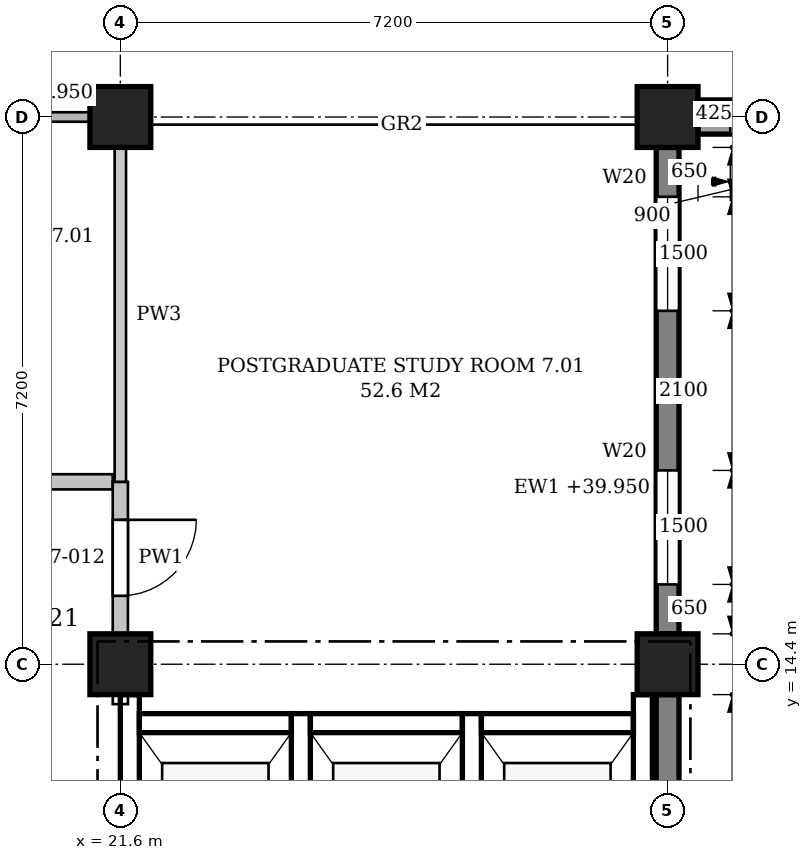
"""IFC4 building model, lengths in metres.
Left out: names, types, materials, properties, quantities, classifications, styles, units other than length and angle.
Written with IfcOpenShell. Run it as: python <this file> out.ifc"""

import sys

from ifc_helpers import new_model, si_unit, direction, frame, frame_2d, origin, origin_2d, place, context, subcontext, project, spatial, polyline, rectangle, outline, extrude, element, fill, save


model = new_model("IFC4")
c1 = context("Model", 3, precision=1e-05, world=origin(), true_north=direction((0.0, 1.0)))
c2 = subcontext(c1, "Body", "Model", "MODEL_VIEW")
j1 = project(units=[si_unit("LENGTHUNIT", "METRE"), si_unit("PLANEANGLEUNIT", "RADIAN")], contexts=[c1])
p1 = place(None, origin())
s1 = spatial("IfcSite", under=j1, at=p1, CompositionType="ELEMENT")
p2 = place(p1, origin())
s2 = spatial("IfcBuilding", under=s1, at=p2, CompositionType="ELEMENT")
p3 = place(p2, frame((0.0, 0.0, 36.0)))
s3 = spatial("IfcBuildingStorey", under=s2, at=p3, CompositionType="ELEMENT", Elevation=36.0)
for number, where, z_axis, x_axis in (
    (1, (21.6, 14.4, 0.0), (0.0, 0.0, 1.0), (1.0, 0.0, 0.0)),
    (2, (21.6, 21.6, 0.0), (0.0, 0.0, 1.0), (1.0, 0.0, 0.0)),
    (3, (28.8, 14.4, 0.0), (0.0, 0.0, 1.0), (1.0, 0.0, 0.0)),
    (4, (28.8, 21.6, 0.0), (0.0, 0.0, 1.0), (1.0, 0.0, 0.0)),
):
    element("IfcColumn", number, at=place(p3, frame(where, z_axis=z_axis, x_axis=x_axis)), inside=s3, PredefinedType="COLUMN", context=c2, shape_type="SweptSolid", body=[
        extrude(rectangle(XDim=0.8, YDim=0.8, at=origin_2d()), origin(), (0.0, 0.0, 1.0), 4.8),
    ])
p4 = place(p3, frame((28.8, 7.6, 0.0), z_axis=(0.0, 0.0, 1.0), x_axis=(0.0, 1.0, 0.0)))
e5 = element("IfcWall", 5, at=p4, inside=s3, PredefinedType="STANDARD", context=c2, shape_type="SweptSolid", body=[
    extrude(rectangle(XDim=6.4, YDim=0.3, at=frame_2d((3.2, 0.0))), origin(), (0.0, 0.0, 1.0), 3.95),
])
p5 = place(p4, frame((0.65, 0.0, 0.9)))
e6 = element("IfcOpeningElement", 6, at=p5, cuts=e5, PredefinedType="OPENING", context=c2, shape_type="SweptSolid", body=[
    extrude(outline(polyline([(0.0, 0.0), (1.5, 0.0), (1.5, 2.25), (0.75, 3.0), (0.0, 2.25), (0.0, 0.0)])), frame((0.0, 0.16, 0.0), z_axis=(0.0, -1.0, 0.0), x_axis=(1.0, 0.0, 0.0)), (0.0, 0.0, 1.0), 0.32),
])
p6 = place(p3, frame((28.8, 14.8, 0.0), z_axis=(0.0, 0.0, 1.0), x_axis=(0.0, 1.0, 0.0)))
e7 = element("IfcWall", 7, at=p6, inside=s3, PredefinedType="STANDARD", context=c2, shape_type="SweptSolid", body=[
    extrude(rectangle(XDim=6.4, YDim=0.3, at=frame_2d((3.2, 0.0))), origin(), (0.0, 0.0, 1.0), 3.95),
])
p7 = place(p6, frame((0.65, 0.0, 0.9)))
e8 = element("IfcOpeningElement", 8, at=p7, cuts=e7, PredefinedType="OPENING", context=c2, shape_type="SweptSolid", body=[
    extrude(outline(polyline([(0.0, 0.0), (1.5, 0.0), (1.5, 2.25), (0.75, 3.0), (0.0, 2.25), (0.0, 0.0)])), frame((0.0, 0.16, 0.0), z_axis=(0.0, -1.0, 0.0), x_axis=(1.0, 0.0, 0.0)), (0.0, 0.0, 1.0), 0.32),
])
p8 = place(p6, frame((4.25, 0.0, 0.9)))
e9 = element("IfcOpeningElement", 9, at=p8, cuts=e7, PredefinedType="OPENING", context=c2, shape_type="SweptSolid", body=[
    extrude(outline(polyline([(0.0, 0.0), (1.5, 0.0), (1.5, 2.25), (0.75, 3.0), (0.0, 2.25), (0.0, 0.0)])), frame((0.0, 0.16, 0.0), z_axis=(0.0, -1.0, 0.0), x_axis=(1.0, 0.0, 0.0)), (0.0, 0.0, 1.0), 0.32),
])
p9 = place(p3, frame((29.2, 21.6, 0.0), z_axis=(0.0, 0.0, 1.0), x_axis=(1.0, 0.0, 0.0)))
e10 = element("IfcWall", 10, at=p9, inside=s3, PredefinedType="STANDARD", context=c2, shape_type="SweptSolid", body=[
    extrude(rectangle(XDim=6.425, YDim=0.45, at=frame_2d((3.212, 0.0))), origin(), (0.0, 0.0, 1.0), 4.1),
])
p10 = place(p9, frame((0.425, 0.0, 0.9)))
e11 = element("IfcOpeningElement", 11, at=p10, cuts=e10, PredefinedType="OPENING", context=c2, shape_type="SweptSolid", body=[
    extrude(outline(polyline([(0.0, 0.0), (0.9, 0.0), (0.9, 2.55), (0.45, 3.0), (0.0, 2.55), (0.0, 0.0)])), frame((0.0, 0.235, 0.0), z_axis=(0.0, -1.0, 0.0), x_axis=(1.0, 0.0, 0.0)), (0.0, 0.0, 1.0), 0.47),
])
p11 = place(p9, frame((1.475, 0.0, 0.9)))
e12 = element("IfcOpeningElement", 12, at=p11, cuts=e10, PredefinedType="OPENING", context=c2, shape_type="SweptSolid", body=[
    extrude(outline(polyline([(0.0, 0.0), (0.9, 0.0), (0.9, 2.55), (0.45, 3.0), (0.0, 2.55), (0.0, 0.0)])), frame((0.0, 0.235, 0.0), z_axis=(0.0, -1.0, 0.0), x_axis=(1.0, 0.0, 0.0)), (0.0, 0.0, 1.0), 0.47),
])
p12 = place(p9, frame((4.25, 0.0, 0.9)))
e13 = element("IfcOpeningElement", 13, at=p12, cuts=e10, PredefinedType="OPENING", context=c2, shape_type="SweptSolid", body=[
    extrude(outline(polyline([(0.0, 0.0), (1.5, 0.0), (1.5, 2.25), (0.75, 3.0), (0.0, 2.25), (0.0, 0.0)])), frame((0.0, 0.235, 0.0), z_axis=(0.0, -1.0, 0.0), x_axis=(1.0, 0.0, 0.0)), (0.0, 0.0, 1.0), 0.47),
])
p13 = place(p3, frame((21.725, 10.45, -0.25), z_axis=(0.0, 0.0, 1.0), x_axis=(0.0, 1.0, 0.0)))
e14 = element("IfcWall", 14, at=p13, inside=s3, PredefinedType="SHEAR", context=c2, shape_type="SweptSolid", body=[
    extrude(rectangle(XDim=3.55, YDim=0.25, at=frame_2d((1.775, 0.0))), origin(), (0.0, 0.0, 1.0), 4.1),
])
for number, where, z_axis, x_axis in (
    (15, (23.975, 10.45, -0.25), (0.0, 0.0, 1.0), (0.0, 1.0, 0.0)),
    (16, (26.225, 10.45, -0.25), (0.0, 0.0, 1.0), (0.0, 1.0, 0.0)),
):
    element("IfcWall", number, at=place(p3, frame(where, z_axis=z_axis, x_axis=x_axis)), inside=s3, PredefinedType="SHEAR", context=c2, shape_type="SweptSolid", body=[
        extrude(rectangle(XDim=3.3, YDim=0.25, at=frame_2d((1.65, 0.0))), origin(), (0.0, 0.0, 1.0), 4.8),
    ])
p14 = place(p3, frame((28.475, 10.45, -0.25), z_axis=(0.0, 0.0, 1.0), x_axis=(0.0, 1.0, 0.0)))
e17 = element("IfcWall", 17, at=p14, inside=s3, PredefinedType="SHEAR", context=c2, shape_type="SweptSolid", body=[
    extrude(rectangle(XDim=3.55, YDim=0.25, at=frame_2d((1.775, 0.0))), origin(), (0.0, 0.0, 1.0), 4.8),
])
for number, where, z_axis, x_axis in (
    (18, (21.85, 13.625, -0.25), (0.0, 0.0, 1.0), (1.0, 0.0, 0.0)),
    (19, (24.1, 13.625, -0.25), (0.0, 0.0, 1.0), (1.0, 0.0, 0.0)),
    (20, (26.35, 13.625, -0.25), (0.0, 0.0, 1.0), (1.0, 0.0, 0.0)),
):
    element("IfcWall", number, at=place(p3, frame(where, z_axis=z_axis, x_axis=x_axis)), inside=s3, PredefinedType="SHEAR", context=c2, shape_type="SweptSolid", body=[
        extrude(rectangle(XDim=2.0, YDim=0.25, at=frame_2d((1.0, 0.0))), origin(), (0.0, 0.0, 1.0), 4.8),
    ])
p15 = place(p3, frame((18.1, 16.8, 0.0), z_axis=(0.0, 0.0, 1.0), x_axis=(1.0, 0.0, 0.0)))
e21 = element("IfcWall", 21, at=p15, inside=s3, PredefinedType="PARTITIONING", context=c2, shape_type="SweptSolid", body=[
    extrude(outline(polyline([(0.0, 0.0), (3.4, 0.0), (3.4, 3.85), (3.275, 3.85), (3.275, 4.55), (0.0, 4.55), (0.0, 0.0)])), frame((0.0, 0.1, 0.0), z_axis=(0.0, -1.0, 0.0), x_axis=(1.0, 0.0, 0.0)), (0.0, 0.0, 1.0), 0.2),
])
p16 = place(p15, frame((1.2, 0.0, 0.0)))
e22 = element("IfcOpeningElement", 22, at=p16, cuts=e21, PredefinedType="OPENING", context=c2, shape_type="SweptSolid", body=[
    extrude(rectangle(XDim=1.0, YDim=2.1, at=frame_2d((0.5, 1.05))), frame((0.0, 0.11, 0.0), z_axis=(0.0, -1.0, 0.0), x_axis=(1.0, 0.0, 0.0)), (0.0, 0.0, 1.0), 0.22),
])
p17 = place(p3, frame((21.6, 13.875, 0.0), z_axis=(0.0, 0.0, 1.0), x_axis=(0.0, 1.0, 0.0)))
e23 = element("IfcWall", 23, at=p17, inside=s3, PredefinedType="PARTITIONING", context=c2, shape_type="SweptSolid", body=[
    extrude(rectangle(XDim=0.125, YDim=0.2, at=frame_2d((0.062, 0.0))), origin(), (0.0, 0.0, 1.0), 3.85),
])
p18 = place(p3, frame((21.6, 14.8, 0.0), z_axis=(0.0, 0.0, 1.0), x_axis=(0.0, 1.0, 0.0)))
e24 = element("IfcWall", 24, at=p18, inside=s3, PredefinedType="PARTITIONING", context=c2, shape_type="SweptSolid", body=[
    extrude(rectangle(XDim=2.0, YDim=0.2, at=frame_2d((1.0, 0.0))), origin(), (0.0, 0.0, 1.0), 3.85),
])
p19 = place(p18, frame((0.5, 0.0, 0.0)))
e25 = element("IfcOpeningElement", 25, at=p19, cuts=e24, PredefinedType="OPENING", context=c2, shape_type="SweptSolid", body=[
    extrude(rectangle(XDim=1.0, YDim=2.1, at=frame_2d((0.5, 1.05))), frame((0.0, 0.11, 0.0), z_axis=(0.0, -1.0, 0.0), x_axis=(1.0, 0.0, 0.0)), (0.0, 0.0, 1.0), 0.22),
])
p20 = place(p3, frame((21.6, 16.8, 0.0), z_axis=(0.0, 0.0, 1.0), x_axis=(0.0, 1.0, 0.0)))
e26 = element("IfcWall", 26, at=p20, inside=s3, PredefinedType="PARTITIONING", context=c2, shape_type="SweptSolid", body=[
    extrude(rectangle(XDim=4.4, YDim=0.15, at=frame_2d((2.2, 0.0))), origin(), (0.0, 0.0, 1.0), 3.85),
])
p21 = place(p7, origin())
e27 = element("IfcWindow", 27, at=p21, inside=s3, PartitioningType="SINGLE_PANEL", PredefinedType="WINDOW", context=c2, shape_type="SweptSolid", body=[
    extrude(outline(polyline([(0.0, 0.0), (1.5, 0.0), (1.5, 2.25), (0.75, 3.0), (0.0, 2.25), (0.0, 0.0)])), frame((0.0, 0.03, 0.0), z_axis=(0.0, -1.0, 0.0), x_axis=(1.0, 0.0, 0.0)), (0.0, 0.0, 1.0), 0.06),
])
fill(e8, e27)
p22 = place(p8, origin())
e28 = element("IfcWindow", 28, at=p22, inside=s3, PartitioningType="SINGLE_PANEL", PredefinedType="WINDOW", context=c2, shape_type="SweptSolid", body=[
    extrude(outline(polyline([(0.0, 0.0), (1.5, 0.0), (1.5, 2.25), (0.75, 3.0), (0.0, 2.25), (0.0, 0.0)])), frame((0.0, 0.03, 0.0), z_axis=(0.0, -1.0, 0.0), x_axis=(1.0, 0.0, 0.0)), (0.0, 0.0, 1.0), 0.06),
])
fill(e9, e28)
p23 = place(p10, origin())
e29 = element("IfcWindow", 29, at=p23, inside=s3, PartitioningType="SINGLE_PANEL", PredefinedType="WINDOW", context=c2, shape_type="SweptSolid", body=[
    extrude(outline(polyline([(0.0, 0.0), (0.9, 0.0), (0.9, 2.55), (0.45, 3.0), (0.0, 2.55), (0.0, 0.0)])), frame((0.0, 0.03, 0.0), z_axis=(0.0, -1.0, 0.0), x_axis=(1.0, 0.0, 0.0)), (0.0, 0.0, 1.0), 0.06),
])
fill(e11, e29)
p24 = place(p19, frame((1.0, 0.0, 0.0), z_axis=(0.0, 0.0, 1.0), x_axis=(-1.0, 0.0, 0.0)))
e30 = element("IfcDoor", 30, at=p24, inside=s3, OperationType="SINGLE_SWING_LEFT", PredefinedType="DOOR", context=c2, shape_type="SweptSolid", body=[
    extrude(rectangle(XDim=1.0, YDim=2.1, at=frame_2d((0.5, 1.05))), frame((0.0, 0.025, 0.0), z_axis=(0.0, -1.0, 0.0), x_axis=(1.0, 0.0, 0.0)), (0.0, 0.0, 1.0), 0.05),
])
fill(e25, e30)
save(model, sys.argv[1])
